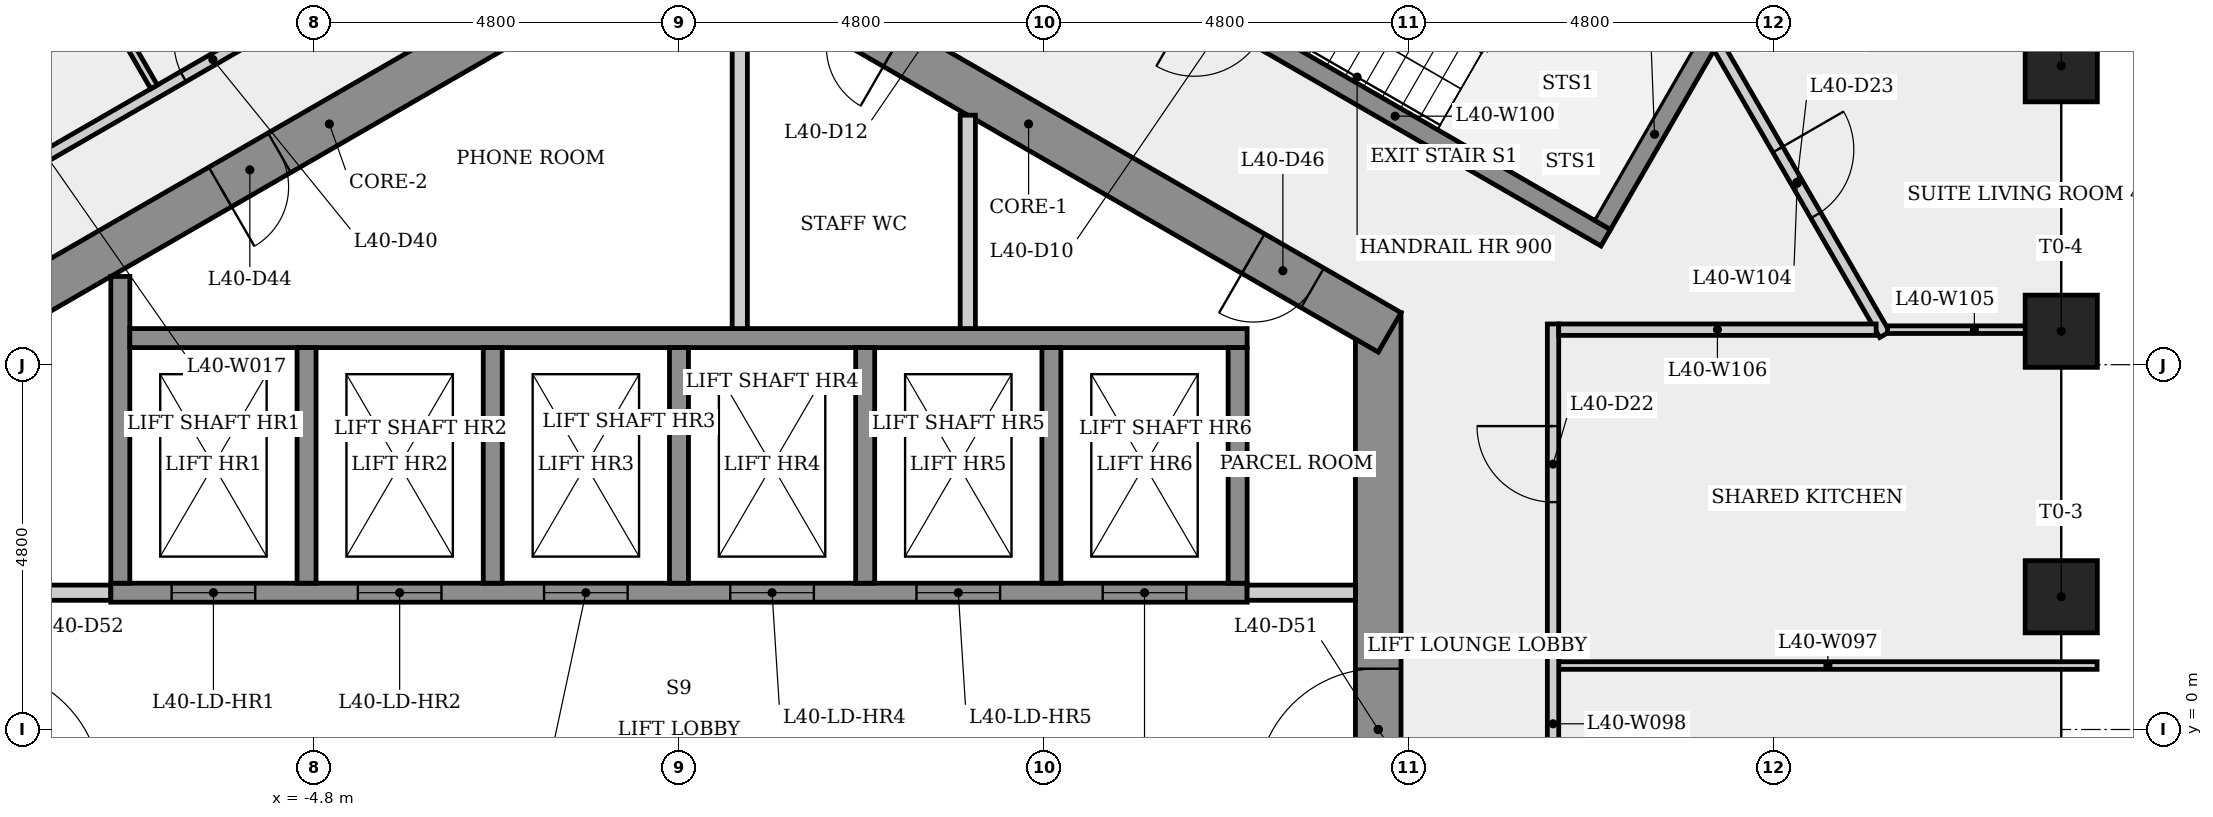
"""IFC4 building model, lengths in metres.
Left out: names, types, materials, properties, quantities, classifications, styles, units other than length and angle.
Written with IfcOpenShell. Run it as: python <this file> out.ifc"""

import sys

from ifc_helpers import new_model, si_unit, direction, frame, frame_2d, origin, origin_2d, place, context, subcontext, project, spatial, rectangle, extrude, element, fill, save


model = new_model("IFC4")
c1 = context("Model", 3, precision=1e-05, world=origin(), true_north=direction((0.0, 1.0)))
c2 = subcontext(c1, "Body", "Model", "MODEL_VIEW")
j1 = project(units=[si_unit("LENGTHUNIT", "METRE"), si_unit("PLANEANGLEUNIT", "RADIAN")], contexts=[c1])
p1 = place(None, origin())
s1 = spatial("IfcSite", under=j1, at=p1, CompositionType="ELEMENT")
p2 = place(p1, origin())
s2 = spatial("IfcBuilding", under=s1, at=p2, CompositionType="ELEMENT")
p3 = place(p2, frame((0.0, 0.0, 152.7)))
s3 = spatial("IfcBuildingStorey", under=s2, at=p3, CompositionType="ELEMENT", Elevation=152.7)
p4 = place(p3, frame((9.2, -5.485, 0.0), z_axis=(0.0, 0.0, 1.0), x_axis=(0.0, 1.0, 0.0)))
e1 = element("IfcWall", 1, at=p4, inside=s3, PredefinedType="SHEAR", context=c2, shape_type="SweptSolid", body=[
    extrude(rectangle(XDim=10.97, YDim=0.6, at=frame_2d((5.485, 0.0))), origin(), (0.0, 0.0, 1.0), 3.4),
])
p5 = place(p4, frame((4.685, 0.0, 0.0)))
e2 = element("IfcOpeningElement", 2, at=p5, cuts=e1, PredefinedType="OPENING", context=c2, shape_type="SweptSolid", body=[
    extrude(rectangle(XDim=1.6, YDim=2.1, at=frame_2d((0.8, 1.05))), frame((0.0, 0.31, 0.0), z_axis=(0.0, -1.0, 0.0), x_axis=(1.0, 0.0, 0.0)), (0.0, 0.0, 1.0), 0.62),
])
p6 = place(p3, frame((9.35, 5.225, 0.0), z_axis=(0.0, 0.0, 1.0), x_axis=(-0.866023993627, 0.500002442456, 0.0)))
e3 = element("IfcWall", 3, at=p6, inside=s3, PredefinedType="SHEAR", context=c2, shape_type="SweptSolid", body=[
    extrude(rectangle(XDim=10.97, YDim=0.6, at=frame_2d((5.485, 0.0))), origin(), (0.0, 0.0, 1.0), 3.4),
])
p7 = place(p6, frame((7.518, 0.0, 0.0)))
e4 = element("IfcOpeningElement", 4, at=p7, cuts=e3, PredefinedType="OPENING", context=c2, shape_type="SweptSolid", body=[
    extrude(rectangle(XDim=0.9, YDim=2.1, at=frame_2d((0.45, 1.05))), frame((0.0, 0.31, 0.0), z_axis=(0.0, -1.0, 0.0), x_axis=(1.0, 0.0, 0.0)), (0.0, 0.0, 1.0), 0.62),
])
p8 = place(p6, frame((1.172, 0.0, 0.0)))
e5 = element("IfcOpeningElement", 5, at=p8, cuts=e3, PredefinedType="OPENING", context=c2, shape_type="SweptSolid", body=[
    extrude(rectangle(XDim=0.9, YDim=2.1, at=frame_2d((0.45, 1.05))), frame((0.0, 0.31, 0.0), z_axis=(0.0, -1.0, 0.0), x_axis=(1.0, 0.0, 0.0)), (0.0, 0.0, 1.0), 0.62),
])
p9 = place(p3, frame((0.15, 10.71, 0.0), z_axis=(0.0, 0.0, 1.0), x_axis=(-0.866023993627, -0.500002442456, 0.0)))
e6 = element("IfcWall", 6, at=p9, inside=s3, PredefinedType="SHEAR", context=c2, shape_type="SweptSolid", body=[
    extrude(rectangle(XDim=10.97, YDim=0.6, at=frame_2d((5.485, 0.0))), origin(), (0.0, 0.0, 1.0), 3.4),
])
p10 = place(p9, frame((6.243, 0.0, 0.0)))
e7 = element("IfcOpeningElement", 7, at=p10, cuts=e6, PredefinedType="OPENING", context=c2, shape_type="SweptSolid", body=[
    extrude(rectangle(XDim=0.9, YDim=2.1, at=frame_2d((0.45, 1.05))), frame((0.0, 0.31, 0.0), z_axis=(0.0, -1.0, 0.0), x_axis=(1.0, 0.0, 0.0)), (0.0, 0.0, 1.0), 0.62),
])
for number, where, z_axis, x_axis in (
    (8, (18.187, 1.747, 0.0), (0.0, 0.0, 1.0), (1.0, 0.0, 0.0)),
    (9, (18.187, 5.24, 0.0), (0.0, 0.0, 1.0), (1.0, 0.0, 0.0)),
    (10, (18.187, 8.734, 0.0), (0.0, 0.0, 1.0), (1.0, 0.0, 0.0)),
):
    element("IfcColumn", number, at=place(p3, frame(where, z_axis=z_axis, x_axis=x_axis)), inside=s3, PredefinedType="COLUMN", context=c2, shape_type="SweptSolid", body=[
        extrude(rectangle(XDim=0.95, YDim=0.95, at=origin_2d()), origin(), (0.0, 0.0, 1.0), 3.4),
    ])
p11 = place(p3, frame((-9.841, 6.674, 0.0), z_axis=(0.0, 0.0, 1.0), x_axis=(0.866024077368, 0.500002297414, 0.0)))
e11 = element("IfcWall", 11, at=p11, inside=s3, PredefinedType="PARTITIONING", context=c2, shape_type="SweptSolid", body=[
    extrude(rectangle(XDim=10.447, YDim=0.15, at=frame_2d((5.223, 0.0))), origin(), (0.0, 0.0, 1.0), 3.05),
])
p12 = place(p11, frame((3.832, 0.0, 0.0)))
e12 = element("IfcOpeningElement", 12, at=p12, cuts=e11, PredefinedType="OPENING", context=c2, shape_type="SweptSolid", body=[
    extrude(rectangle(XDim=0.9, YDim=2.1, at=frame_2d((0.45, 1.05))), frame((0.0, 0.085, 0.0), z_axis=(0.0, -1.0, 0.0), x_axis=(1.0, 0.0, 0.0)), (0.0, 0.0, 1.0), 0.17),
])
p13 = place(p3, frame((-8.9, 1.8, 0.0), z_axis=(0.0, 0.0, 1.0), x_axis=(1.0, 0.0, 0.0)))
e13 = element("IfcWall", 13, at=p13, inside=s3, PredefinedType="PARTITIONING", context=c2, shape_type="SweptSolid", body=[
    extrude(rectangle(XDim=1.425, YDim=0.2, at=frame_2d((0.712, 0.0))), origin(), (0.0, 0.0, 1.0), 3.05),
])
p14 = place(p3, frame((-10.612, 14.873, 0.0), z_axis=(0.0, 0.0, 1.0), x_axis=(0.499972430261, -0.866041320595, 0.0)))
e14 = element("IfcWall", 14, at=p14, inside=s3, PredefinedType="PARTITIONING", context=c2, shape_type="SweptSolid", body=[
    extrude(rectangle(XDim=7.412, YDim=0.1, at=frame_2d((3.706, 0.0))), origin(), (0.0, 0.0, 1.0), 3.05),
])
p15 = place(p3, frame((-7.475, 1.8, 0.0), z_axis=(0.0, 0.0, 1.0), x_axis=(1.0, 0.0, 0.0)))
e15 = element("IfcWall", 15, at=p15, inside=s3, PredefinedType="SHEAR", context=c2, shape_type="SweptSolid", body=[
    extrude(rectangle(XDim=14.95, YDim=0.25, at=frame_2d((7.475, 0.0))), origin(), (0.0, 0.0, 1.0), 3.05),
])
p16 = place(p15, frame((0.8, 0.0, 0.0)))
e16 = element("IfcOpeningElement", 16, at=p16, cuts=e15, PredefinedType="OPENING", context=c2, shape_type="SweptSolid", body=[
    extrude(rectangle(XDim=1.1, YDim=2.1, at=frame_2d((0.55, 1.05))), frame((0.0, 0.135, 0.0), z_axis=(0.0, -1.0, 0.0), x_axis=(1.0, 0.0, 0.0)), (0.0, 0.0, 1.0), 0.27),
])
p17 = place(p15, frame((3.25, 0.0, 0.0)))
e17 = element("IfcOpeningElement", 17, at=p17, cuts=e15, PredefinedType="OPENING", context=c2, shape_type="SweptSolid", body=[
    extrude(rectangle(XDim=1.1, YDim=2.1, at=frame_2d((0.55, 1.05))), frame((0.0, 0.135, 0.0), z_axis=(0.0, -1.0, 0.0), x_axis=(1.0, 0.0, 0.0)), (0.0, 0.0, 1.0), 0.27),
])
p18 = place(p15, frame((5.7, 0.0, 0.0)))
e18 = element("IfcOpeningElement", 18, at=p18, cuts=e15, PredefinedType="OPENING", context=c2, shape_type="SweptSolid", body=[
    extrude(rectangle(XDim=1.1, YDim=2.1, at=frame_2d((0.55, 1.05))), frame((0.0, 0.135, 0.0), z_axis=(0.0, -1.0, 0.0), x_axis=(1.0, 0.0, 0.0)), (0.0, 0.0, 1.0), 0.27),
])
p19 = place(p15, frame((8.15, 0.0, 0.0)))
e19 = element("IfcOpeningElement", 19, at=p19, cuts=e15, PredefinedType="OPENING", context=c2, shape_type="SweptSolid", body=[
    extrude(rectangle(XDim=1.1, YDim=2.1, at=frame_2d((0.55, 1.05))), frame((0.0, 0.135, 0.0), z_axis=(0.0, -1.0, 0.0), x_axis=(1.0, 0.0, 0.0)), (0.0, 0.0, 1.0), 0.27),
])
p20 = place(p15, frame((10.6, 0.0, 0.0)))
e20 = element("IfcOpeningElement", 20, at=p20, cuts=e15, PredefinedType="OPENING", context=c2, shape_type="SweptSolid", body=[
    extrude(rectangle(XDim=1.1, YDim=2.1, at=frame_2d((0.55, 1.05))), frame((0.0, 0.135, 0.0), z_axis=(0.0, -1.0, 0.0), x_axis=(1.0, 0.0, 0.0)), (0.0, 0.0, 1.0), 0.27),
])
p21 = place(p15, frame((13.05, 0.0, 0.0)))
e21 = element("IfcOpeningElement", 21, at=p21, cuts=e15, PredefinedType="OPENING", context=c2, shape_type="SweptSolid", body=[
    extrude(rectangle(XDim=1.1, YDim=2.1, at=frame_2d((0.55, 1.05))), frame((0.0, 0.135, 0.0), z_axis=(0.0, -1.0, 0.0), x_axis=(1.0, 0.0, 0.0)), (0.0, 0.0, 1.0), 0.27),
])
p22 = place(p3, frame((-7.35, 1.925, 0.0), z_axis=(0.0, 0.0, 1.0), x_axis=(0.0, 1.0, 0.0)))
e22 = element("IfcWall", 22, at=p22, inside=s3, PredefinedType="SHEAR", context=c2, shape_type="SweptSolid", body=[
    extrude(rectangle(XDim=4.036, YDim=0.25, at=frame_2d((2.018, 0.0))), origin(), (0.0, 0.0, 1.0), 3.05),
])
p23 = place(p3, frame((-7.225, 5.15, 0.0), z_axis=(0.0, 0.0, 1.0), x_axis=(1.0, 0.0, 0.0)))
e23 = element("IfcWall", 23, at=p23, inside=s3, PredefinedType="SHEAR", context=c2, shape_type="SweptSolid", body=[
    extrude(rectangle(XDim=14.7, YDim=0.25, at=frame_2d((7.35, 0.0))), origin(), (0.0, 0.0, 1.0), 3.05),
])
for number, where, z_axis, x_axis in (
    (24, (-4.9, 5.025, 0.0), (0.0, 0.0, 1.0), (0.0, -1.0, 0.0)),
    (25, (-2.45, 5.025, 0.0), (0.0, 0.0, 1.0), (0.0, -1.0, 0.0)),
    (26, (0.0, 5.025, 0.0), (0.0, 0.0, 1.0), (0.0, -1.0, 0.0)),
):
    element("IfcWall", number, at=place(p3, frame(where, z_axis=z_axis, x_axis=x_axis)), inside=s3, PredefinedType="SHEAR", context=c2, shape_type="SweptSolid", body=[
        extrude(rectangle(XDim=3.1, YDim=0.25, at=frame_2d((1.55, 0.0))), origin(), (0.0, 0.0, 1.0), 3.4),
    ])
p24 = place(p3, frame((0.8, 9.815, 0.0), z_axis=(0.0, 0.0, 1.0), x_axis=(0.0, -1.0, 0.0)))
e27 = element("IfcWall", 27, at=p24, inside=s3, PredefinedType="PARTITIONING", context=c2, shape_type="SweptSolid", body=[
    extrude(rectangle(XDim=4.54, YDim=0.2, at=frame_2d((2.27, 0.0))), origin(), (0.0, 0.0, 1.0), 3.05),
])
p25 = place(p3, frame((2.45, 5.025, 0.0), z_axis=(0.0, 0.0, 1.0), x_axis=(0.0, -1.0, 0.0)))
e28 = element("IfcWall", 28, at=p25, inside=s3, PredefinedType="SHEAR", context=c2, shape_type="SweptSolid", body=[
    extrude(rectangle(XDim=3.1, YDim=0.25, at=frame_2d((1.55, 0.0))), origin(), (0.0, 0.0, 1.0), 3.4),
])
p26 = place(p3, frame((3.8, 8.083, 0.0), z_axis=(0.0, 0.0, 1.0), x_axis=(0.0, -1.0, 0.0)))
e29 = element("IfcWall", 29, at=p26, inside=s3, PredefinedType="PARTITIONING", context=c2, shape_type="SweptSolid", body=[
    extrude(rectangle(XDim=2.808, YDim=0.2, at=frame_2d((1.404, 0.0))), origin(), (0.0, 0.0, 1.0), 3.05),
])
p27 = place(p3, frame((4.9, 5.025, 0.0), z_axis=(0.0, 0.0, 1.0), x_axis=(0.0, -1.0, 0.0)))
e30 = element("IfcWall", 30, at=p27, inside=s3, PredefinedType="SHEAR", context=c2, shape_type="SweptSolid", body=[
    extrude(rectangle(XDim=3.1, YDim=0.25, at=frame_2d((1.55, 0.0))), origin(), (0.0, 0.0, 1.0), 3.4),
])
p28 = place(p3, frame((7.475, 1.8, 0.0), z_axis=(0.0, 0.0, 1.0), x_axis=(1.0, 0.0, 0.0)))
e31 = element("IfcWall", 31, at=p28, inside=s3, PredefinedType="PARTITIONING", context=c2, shape_type="SweptSolid", body=[
    extrude(rectangle(XDim=1.425, YDim=0.2, at=frame_2d((0.712, 0.0))), origin(), (0.0, 0.0, 1.0), 3.05),
])
p29 = place(p3, frame((7.35, 5.025, 0.0), z_axis=(0.0, 0.0, 1.0), x_axis=(0.0, -1.0, 0.0)))
e32 = element("IfcWall", 32, at=p29, inside=s3, PredefinedType="SHEAR", context=c2, shape_type="SweptSolid", body=[
    extrude(rectangle(XDim=3.1, YDim=0.25, at=frame_2d((1.55, 0.0))), origin(), (0.0, 0.0, 1.0), 3.4),
])
p30 = place(p3, frame((11.575, 0.842, 0.0), z_axis=(0.0, 0.0, 1.0), x_axis=(1.0, 0.0, 0.0)))
e33 = element("IfcWall", 33, at=p30, inside=s3, PredefinedType="PARTITIONING", context=c2, shape_type="SweptSolid", body=[
    extrude(rectangle(XDim=7.083, YDim=0.1, at=frame_2d((3.541, 0.0))), origin(), (0.0, 0.0, 1.0), 3.05),
])
p31 = place(p3, frame((11.5, -5.186, 0.0), z_axis=(0.0, 0.0, 1.0), x_axis=(0.0, 1.0, 0.0)))
e34 = element("IfcWall", 34, at=p31, inside=s3, PredefinedType="PARTITIONING", context=c2, shape_type="SweptSolid", body=[
    extrude(rectangle(XDim=10.521, YDim=0.15, at=frame_2d((5.261, 0.0))), origin(), (0.0, 0.0, 1.0), 3.05),
])
p32 = place(p31, frame((2.499, 0.0, 0.0)))
e35 = element("IfcOpeningElement", 35, at=p32, cuts=e34, PredefinedType="OPENING", context=c2, shape_type="SweptSolid", body=[
    extrude(rectangle(XDim=1.0, YDim=2.1, at=frame_2d((0.5, 1.05))), frame((0.0, 0.085, 0.0), z_axis=(0.0, -1.0, 0.0), x_axis=(1.0, 0.0, 0.0)), (0.0, 0.0, 1.0), 0.17),
])
p33 = place(p31, frame((8.178, 0.0, 0.0)))
e36 = element("IfcOpeningElement", 36, at=p33, cuts=e34, PredefinedType="OPENING", context=c2, shape_type="SweptSolid", body=[
    extrude(rectangle(XDim=1.0, YDim=2.1, at=frame_2d((0.5, 1.05))), frame((0.0, 0.085, 0.0), z_axis=(0.0, -1.0, 0.0), x_axis=(1.0, 0.0, 0.0)), (0.0, 0.0, 1.0), 0.17),
])
p34 = place(p3, frame((12.194, 6.47, 0.0), z_axis=(0.0, 0.0, 1.0), x_axis=(-0.866025499775, 0.499999833739, 0.0)))
e37 = element("IfcWall", 37, at=p34, inside=s3, PredefinedType="SHEAR", context=c2, shape_type="SweptSolid", body=[
    extrude(rectangle(XDim=6.4, YDim=0.25, at=frame_2d((3.2, 0.0))), origin(), (0.0, 0.0, 1.0), 3.05),
])
p35 = place(p34, frame((5.25, 0.0, 0.0)))
e38 = element("IfcOpeningElement", 38, at=p35, cuts=e37, PredefinedType="OPENING", context=c2, shape_type="SweptSolid", body=[
    extrude(rectangle(XDim=1.0, YDim=2.1, at=frame_2d((0.5, 1.05))), frame((0.0, 0.135, 0.0), z_axis=(0.0, -1.0, 0.0), x_axis=(1.0, 0.0, 0.0)), (0.0, 0.0, 1.0), 0.27),
])
p36 = place(p3, frame((13.523, 9.022, 0.0), z_axis=(0.0, 0.0, 1.0), x_axis=(-0.500034990121, -0.866005201286, 0.0)))
e39 = element("IfcWall", 39, at=p36, inside=s3, PredefinedType="SHEAR", context=c2, shape_type="SweptSolid", body=[
    extrude(rectangle(XDim=2.75, YDim=0.25, at=frame_2d((1.375, 0.0))), origin(), (0.0, 0.0, 1.0), 3.05),
])
p37 = place(p3, frame((13.563, 9.179, 0.0), z_axis=(0.0, 0.0, 1.0), x_axis=(0.499998129301, -0.86602648383, 0.0)))
e40 = element("IfcWall", 40, at=p37, inside=s3, PredefinedType="PARTITIONING", context=c2, shape_type="SweptSolid", body=[
    extrude(rectangle(XDim=4.6, YDim=0.15, at=frame_2d((2.3, 0.0))), origin(), (0.0, 0.0, 1.0), 3.05),
])
p38 = place(p37, frame((1.787, 0.0, 0.0)))
e41 = element("IfcOpeningElement", 41, at=p38, cuts=e40, PredefinedType="OPENING", context=c2, shape_type="SweptSolid", body=[
    extrude(rectangle(XDim=1.0, YDim=2.1, at=frame_2d((0.5, 1.05))), frame((0.0, 0.085, 0.0), z_axis=(0.0, -1.0, 0.0), x_axis=(1.0, 0.0, 0.0)), (0.0, 0.0, 1.0), 0.17),
])
p39 = place(p3, frame((15.901, 5.261, 0.0), z_axis=(0.0, 0.0, 1.0), x_axis=(1.0, 0.0, 0.0)))
e42 = element("IfcWall", 42, at=p39, inside=s3, PredefinedType="PARTITIONING", context=c2, shape_type="SweptSolid", body=[
    extrude(rectangle(XDim=2.286, YDim=0.1, at=frame_2d((1.143, 0.0))), origin(), (0.0, 0.0, 1.0), 3.05),
])
p40 = place(p3, frame((15.751, 5.261, 0.0), z_axis=(0.0, 0.0, 1.0), x_axis=(-1.0, 0.0, 0.0)))
e43 = element("IfcWall", 43, at=p40, inside=s3, PredefinedType="PARTITIONING", context=c2, shape_type="SweptSolid", body=[
    extrude(rectangle(XDim=4.176, YDim=0.15, at=frame_2d((2.088, 0.0))), origin(), (0.0, 0.0, 1.0), 3.05),
])
p41 = place(p16, origin())
e44 = element("IfcDoor", 44, at=p41, inside=s3, OperationType="SLIDING_TO_LEFT", PredefinedType="DOOR", context=c2, shape_type="SweptSolid", body=[
    extrude(rectangle(XDim=1.1, YDim=2.1, at=frame_2d((0.55, 1.05))), frame((0.0, 0.025, 0.0), z_axis=(0.0, -1.0, 0.0), x_axis=(1.0, 0.0, 0.0)), (0.0, 0.0, 1.0), 0.05),
])
fill(e16, e44)
p42 = place(p17, origin())
e45 = element("IfcDoor", 45, at=p42, inside=s3, OperationType="SLIDING_TO_LEFT", PredefinedType="DOOR", context=c2, shape_type="SweptSolid", body=[
    extrude(rectangle(XDim=1.1, YDim=2.1, at=frame_2d((0.55, 1.05))), frame((0.0, 0.025, 0.0), z_axis=(0.0, -1.0, 0.0), x_axis=(1.0, 0.0, 0.0)), (0.0, 0.0, 1.0), 0.05),
])
fill(e17, e45)
p43 = place(p18, origin())
e46 = element("IfcDoor", 46, at=p43, inside=s3, OperationType="SLIDING_TO_LEFT", PredefinedType="DOOR", context=c2, shape_type="SweptSolid", body=[
    extrude(rectangle(XDim=1.1, YDim=2.1, at=frame_2d((0.55, 1.05))), frame((0.0, 0.025, 0.0), z_axis=(0.0, -1.0, 0.0), x_axis=(1.0, 0.0, 0.0)), (0.0, 0.0, 1.0), 0.05),
])
fill(e18, e46)
p44 = place(p19, origin())
e47 = element("IfcDoor", 47, at=p44, inside=s3, OperationType="SLIDING_TO_LEFT", PredefinedType="DOOR", context=c2, shape_type="SweptSolid", body=[
    extrude(rectangle(XDim=1.1, YDim=2.1, at=frame_2d((0.55, 1.05))), frame((0.0, 0.025, 0.0), z_axis=(0.0, -1.0, 0.0), x_axis=(1.0, 0.0, 0.0)), (0.0, 0.0, 1.0), 0.05),
])
fill(e19, e47)
p45 = place(p20, origin())
e48 = element("IfcDoor", 48, at=p45, inside=s3, OperationType="SLIDING_TO_LEFT", PredefinedType="DOOR", context=c2, shape_type="SweptSolid", body=[
    extrude(rectangle(XDim=1.1, YDim=2.1, at=frame_2d((0.55, 1.05))), frame((0.0, 0.025, 0.0), z_axis=(0.0, -1.0, 0.0), x_axis=(1.0, 0.0, 0.0)), (0.0, 0.0, 1.0), 0.05),
])
fill(e20, e48)
p46 = place(p21, origin())
e49 = element("IfcDoor", 49, at=p46, inside=s3, OperationType="SLIDING_TO_LEFT", PredefinedType="DOOR", context=c2, shape_type="SweptSolid", body=[
    extrude(rectangle(XDim=1.1, YDim=2.1, at=frame_2d((0.55, 1.05))), frame((0.0, 0.025, 0.0), z_axis=(0.0, -1.0, 0.0), x_axis=(1.0, 0.0, 0.0)), (0.0, 0.0, 1.0), 0.05),
])
fill(e21, e49)
p47 = place(p33, origin())
e50 = element("IfcDoor", 50, at=p47, inside=s3, OperationType="SINGLE_SWING_RIGHT", PredefinedType="DOOR", context=c2, shape_type="SweptSolid", body=[
    extrude(rectangle(XDim=1.0, YDim=2.1, at=frame_2d((0.5, 1.05))), frame((0.0, 0.025, 0.0), z_axis=(0.0, -1.0, 0.0), x_axis=(1.0, 0.0, 0.0)), (0.0, 0.0, 1.0), 0.05),
])
fill(e36, e50)
p48 = place(p38, origin())
e51 = element("IfcDoor", 51, at=p48, inside=s3, OperationType="SINGLE_SWING_LEFT", PredefinedType="DOOR", context=c2, shape_type="SweptSolid", body=[
    extrude(rectangle(XDim=1.0, YDim=2.1, at=frame_2d((0.5, 1.05))), frame((0.0, 0.025, 0.0), z_axis=(0.0, -1.0, 0.0), x_axis=(1.0, 0.0, 0.0)), (0.0, 0.0, 1.0), 0.05),
])
fill(e41, e51)
p49 = place(p12, origin())
e52 = element("IfcDoor", 52, at=p49, inside=s3, OperationType="SINGLE_SWING_RIGHT", PredefinedType="DOOR", context=c2, shape_type="SweptSolid", body=[
    extrude(rectangle(XDim=0.9, YDim=2.1, at=frame_2d((0.45, 1.05))), frame((0.0, 0.025, 0.0), z_axis=(0.0, -1.0, 0.0), x_axis=(1.0, 0.0, 0.0)), (0.0, 0.0, 1.0), 0.05),
])
fill(e12, e52)
p50 = place(p10, origin())
e53 = element("IfcDoor", 53, at=p50, inside=s3, OperationType="SINGLE_SWING_RIGHT", PredefinedType="DOOR", context=c2, shape_type="SweptSolid", body=[
    extrude(rectangle(XDim=0.9, YDim=2.1, at=frame_2d((0.45, 1.05))), frame((0.0, 0.025, 0.0), z_axis=(0.0, -1.0, 0.0), x_axis=(1.0, 0.0, 0.0)), (0.0, 0.0, 1.0), 0.05),
])
fill(e7, e53)
p51 = place(p8, origin())
e54 = element("IfcDoor", 54, at=p51, inside=s3, OperationType="SINGLE_SWING_RIGHT", PredefinedType="DOOR", context=c2, shape_type="SweptSolid", body=[
    extrude(rectangle(XDim=0.9, YDim=2.1, at=frame_2d((0.45, 1.05))), frame((0.0, 0.025, 0.0), z_axis=(0.0, -1.0, 0.0), x_axis=(1.0, 0.0, 0.0)), (0.0, 0.0, 1.0), 0.05),
])
fill(e5, e54)
p52 = place(p5, origin())
e55 = element("IfcDoor", 55, at=p52, inside=s3, OperationType="SINGLE_SWING_LEFT", PredefinedType="DOOR", context=c2, shape_type="SweptSolid", body=[
    extrude(rectangle(XDim=1.6, YDim=2.1, at=frame_2d((0.8, 1.05))), frame((0.0, 0.025, 0.0), z_axis=(0.0, -1.0, 0.0), x_axis=(1.0, 0.0, 0.0)), (0.0, 0.0, 1.0), 0.05),
])
fill(e2, e55)
save(model, sys.argv[1])
